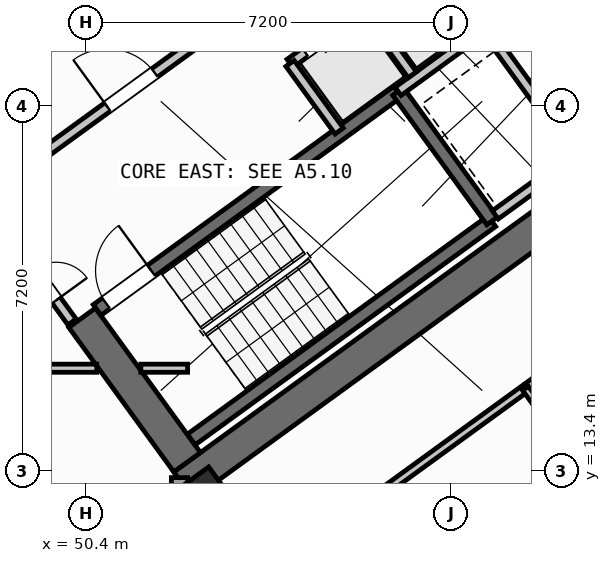
"""IFC4 building model, lengths in metres.
Left out: names, types, materials, properties, quantities, classifications, styles, units other than length and angle.
Written with IfcOpenShell. Run it as: python <this file> out.ifc"""

import sys

from ifc_helpers import new_model, si_unit, direction, frame, frame_2d, origin, origin_2d, place, context, subcontext, project, spatial, rectangle, hollow_rectangle, extrude, source, transform, mapped, element, fill, save


model = new_model("IFC4")
c1 = context("Model", 3, precision=1e-05, world=origin(), true_north=direction((0.0, 1.0)))
c2 = subcontext(c1, "Body", "Model", "MODEL_VIEW")
j1 = project(units=[si_unit("LENGTHUNIT", "METRE"), si_unit("PLANEANGLEUNIT", "RADIAN")], contexts=[c1])
p1 = place(None, origin())
s1 = spatial("IfcSite", under=j1, at=p1, CompositionType="ELEMENT")
p2 = place(p1, origin())
s2 = spatial("IfcBuilding", under=s1, at=p2, CompositionType="ELEMENT")
p3 = place(p2, frame((0.0, 0.0, 27.6)))
s3 = spatial("IfcBuildingStorey", under=s2, at=p3, CompositionType="ELEMENT", Elevation=27.6)
p4 = place(p3, frame((52.318, 13.11, 0.0), z_axis=(0.0, 0.0, 1.0), x_axis=(0.809019445368, 0.587781878776, 0.0)))
e1 = element("IfcWall", 1, at=p4, inside=s3, PredefinedType="SHEAR", context=c2, shape_type="SweptSolid", body=[
    extrude(rectangle(XDim=12.44, YDim=0.65, at=frame_2d((6.22, 0.0))), origin(), (0.0, 0.0, 1.0), 3.35),
])
p5 = place(p3, frame((52.39, 13.564, 0.0), z_axis=(0.0, 0.0, 1.0), x_axis=(-0.58779688989, 0.809008539037, 0.0)))
e2 = element("IfcWall", 2, at=p5, inside=s3, PredefinedType="SHEAR", context=c2, shape_type="SweptSolid", body=[
    extrude(rectangle(XDim=3.525, YDim=0.65, at=frame_2d((1.763, 0.0))), origin(), (0.0, 0.0, 1.0), 3.35),
])
m1 = source(origin(), c2, "Body", "SweptSolid", [
    extrude(hollow_rectangle(XDim=1.0, YDim=1.0, WallThickness=0.04, at=origin_2d()), origin(), (0.0, 0.0, 1.0), 3.6),
])
p6 = place(p3, frame((52.705, 12.773, 0.0), z_axis=(0.0, 0.0, 1.0), x_axis=(0.809016994375, 0.587785252292, 0.0)))
e3 = element("IfcColumn", 3, at=p6, inside=s3, PredefinedType="COLUMN", context=c2, shape_type="MappedRepresentation", body=[
    mapped(m1, transform((0.0, 0.0, 0.0), scale=1.0)),
])
p7 = place(p3, frame((58.455, 35.484, 0.0), z_axis=(0.0, 0.0, 1.0), x_axis=(0.587783625747, -0.809018176127, 0.0)))
e4 = element("IfcWall", 4, at=p7, inside=s3, PredefinedType="STANDARD", context=c2, shape_type="SweptSolid", body=[
    extrude(rectangle(XDim=21.587, YDim=0.32, at=frame_2d((10.794, 0.0))), origin(), (0.0, 0.0, 1.0), 2.725),
])
p8 = place(p7, frame((2.994, 0.0, 0.8)))
e5 = element("IfcOpeningElement", 5, at=p8, cuts=e4, PredefinedType="OPENING", context=c2, shape_type="SweptSolid", body=[
    extrude(rectangle(XDim=2.1, YDim=1.55, at=frame_2d((1.05, 0.775))), frame((0.0, 0.17, 0.0), z_axis=(0.0, -1.0, 0.0), x_axis=(1.0, 0.0, 0.0)), (0.0, 0.0, 1.0), 0.34),
])
p9 = place(p7, frame((11.934, 0.0, 0.85)))
e6 = element("IfcOpeningElement", 6, at=p9, cuts=e4, PredefinedType="OPENING", context=c2, shape_type="SweptSolid", body=[
    extrude(rectangle(XDim=1.8, YDim=1.5, at=frame_2d((0.9, 0.75))), frame((0.0, 0.17, 0.0), z_axis=(0.0, -1.0, 0.0), x_axis=(1.0, 0.0, 0.0)), (0.0, 0.0, 1.0), 0.34),
])
p10 = place(p7, frame((18.535, 0.0, 0.85)))
e7 = element("IfcOpeningElement", 7, at=p10, cuts=e4, PredefinedType="OPENING", context=c2, shape_type="SweptSolid", body=[
    extrude(rectangle(XDim=1.5, YDim=1.5, at=frame_2d((0.75, 0.75))), frame((0.0, 0.17, 0.0), z_axis=(0.0, -1.0, 0.0), x_axis=(1.0, 0.0, 0.0)), (0.0, 0.0, 1.0), 0.34),
])
p11 = place(p3, frame((71.098, 17.731, 0.0), z_axis=(0.0, 0.0, 1.0), x_axis=(-0.809021120468, -0.587779573171, 0.0)))
e8 = element("IfcWall", 8, at=p11, inside=s3, PredefinedType="STANDARD", context=c2, shape_type="SweptSolid", body=[
    extrude(rectangle(XDim=17.588, YDim=0.32, at=frame_2d((8.794, 0.0))), origin(), (0.0, 0.0, 1.0), 3.35),
])
p12 = place(p11, frame((1.624, 0.0, 0.0)))
e9 = element("IfcOpeningElement", 9, at=p12, cuts=e8, PredefinedType="OPENING", context=c2, shape_type="SweptSolid", body=[
    extrude(rectangle(XDim=1.05, YDim=2.15, at=frame_2d((0.525, 1.075))), frame((0.0, 0.17, 0.0), z_axis=(0.0, -1.0, 0.0), x_axis=(1.0, 0.0, 0.0)), (0.0, 0.0, 1.0), 0.34),
])
p13 = place(p11, frame((4.104, 0.0, 1.0)))
e10 = element("IfcOpeningElement", 10, at=p13, cuts=e8, PredefinedType="OPENING", context=c2, shape_type="SweptSolid", body=[
    extrude(rectangle(XDim=0.9, YDim=1.25, at=frame_2d((0.45, 0.625))), frame((0.0, 0.17, 0.0), z_axis=(0.0, -1.0, 0.0), x_axis=(1.0, 0.0, 0.0)), (0.0, 0.0, 1.0), 0.34),
])
p14 = place(p11, frame((7.879, 0.0, 0.85)))
e11 = element("IfcOpeningElement", 11, at=p14, cuts=e8, PredefinedType="OPENING", context=c2, shape_type="SweptSolid", body=[
    extrude(rectangle(XDim=1.8, YDim=1.5, at=frame_2d((0.9, 0.75))), frame((0.0, 0.17, 0.0), z_axis=(0.0, -1.0, 0.0), x_axis=(1.0, 0.0, 0.0)), (0.0, 0.0, 1.0), 0.34),
])
p15 = place(p11, frame((12.849, 0.0, 0.85)))
e12 = element("IfcOpeningElement", 12, at=p15, cuts=e8, PredefinedType="OPENING", context=c2, shape_type="SweptSolid", body=[
    extrude(rectangle(XDim=1.8, YDim=1.5, at=frame_2d((0.9, 0.75))), frame((0.0, 0.17, 0.0), z_axis=(0.0, -1.0, 0.0), x_axis=(1.0, 0.0, 0.0)), (0.0, 0.0, 1.0), 0.34),
])
p16 = place(p3, frame((52.24, 13.261, 0.0), z_axis=(0.0, 0.0, 1.0), x_axis=(0.0, -1.0, 0.0)))
e13 = element("IfcWall", 13, at=p16, inside=s3, PredefinedType="STANDARD", context=c2, shape_type="SweptSolid", body=[
    extrude(rectangle(XDim=9.795, YDim=0.32, at=frame_2d((4.897, 0.0))), origin(), (0.0, 0.0, 1.0), 3.35),
])
p17 = place(p16, frame((2.349, 0.0, 0.8)))
e14 = element("IfcOpeningElement", 14, at=p17, cuts=e13, PredefinedType="OPENING", context=c2, shape_type="SweptSolid", body=[
    extrude(rectangle(XDim=2.1, YDim=1.55, at=frame_2d((1.05, 0.775))), frame((0.0, 0.17, 0.0), z_axis=(0.0, -1.0, 0.0), x_axis=(1.0, 0.0, 0.0)), (0.0, 0.0, 1.0), 0.34),
])
p18 = place(p16, frame((7.03, 0.0, 0.85)))
e15 = element("IfcOpeningElement", 15, at=p18, cuts=e13, PredefinedType="OPENING", context=c2, shape_type="SweptSolid", body=[
    extrude(rectangle(XDim=1.8, YDim=1.5, at=frame_2d((0.9, 0.75))), frame((0.0, 0.17, 0.0), z_axis=(0.0, -1.0, 0.0), x_axis=(1.0, 0.0, 0.0)), (0.0, 0.0, 1.0), 0.34),
])
p19 = place(p3, frame((52.472, 14.013, 0.0), z_axis=(0.0, 0.0, 1.0), x_axis=(0.809028366311, 0.587769599847, 0.0)))
e16 = element("IfcWall", 16, at=p19, inside=s3, PredefinedType="SHEAR", context=c2, shape_type="SweptSolid", body=[
    extrude(rectangle(XDim=7.33, YDim=0.26, at=frame_2d((3.665, 0.0))), origin(), (0.0, 0.0, 1.0), 3.35),
])
p20 = place(p3, frame((50.615, 16.57, 0.0), z_axis=(0.0, 0.0, 1.0), x_axis=(0.809028366311, 0.587769599847, 0.0)))
e17 = element("IfcWall", 17, at=p20, inside=s3, PredefinedType="SHEAR", context=c2, shape_type="SweptSolid", body=[
    extrude(rectangle(XDim=7.33, YDim=0.26, at=frame_2d((3.665, 0.0))), origin(), (0.0, 0.0, 1.0), 3.35),
])
p21 = place(p20, frame((0.22, 0.0, 0.0)))
e18 = element("IfcOpeningElement", 18, at=p21, cuts=e17, PredefinedType="OPENING", context=c2, shape_type="SweptSolid", body=[
    extrude(rectangle(XDim=1.1, YDim=2.1, at=frame_2d((0.55, 1.05))), frame((0.0, 0.14, 0.0), z_axis=(0.0, -1.0, 0.0), x_axis=(1.0, 0.0, 0.0)), (0.0, 0.0, 1.0), 0.28),
])
p22 = place(p3, frame((58.41, 18.327, 0.0), z_axis=(0.0, 0.0, 1.0), x_axis=(-0.58776738483, 0.809029975545, 0.0)))
e19 = element("IfcWall", 19, at=p22, inside=s3, PredefinedType="SHEAR", context=c2, shape_type="SweptSolid", body=[
    extrude(rectangle(XDim=3.16, YDim=0.26, at=frame_2d((1.58, 0.0))), origin(), (0.0, 0.0, 1.0), 3.35),
])
p23 = place(p3, frame((47.106, 21.437, 0.0), z_axis=(0.0, 0.0, 1.0), x_axis=(0.809012514015, 0.58779141893, 0.0)))
e20 = element("IfcWall", 20, at=p23, inside=s3, PredefinedType="STANDARD", context=c2, shape_type="SweptSolid", body=[
    extrude(rectangle(XDim=3.398, YDim=0.2, at=frame_2d((1.699, 0.0))), origin(), (0.0, 0.0, 1.0), 3.34),
])
p24 = place(p23, frame((0.408, 0.0, 0.0)))
e21 = element("IfcOpeningElement", 21, at=p24, cuts=e20, PredefinedType="OPENING", context=c2, shape_type="SweptSolid", body=[
    extrude(rectangle(XDim=1.3, YDim=2.2, at=frame_2d((0.65, 1.1))), frame((0.0, 0.11, 0.0), z_axis=(0.0, -1.0, 0.0), x_axis=(1.0, 0.0, 0.0)), (0.0, 0.0, 1.0), 0.22),
])
p25 = place(p3, frame((48.799, 19.107, 0.0), z_axis=(0.0, 0.0, 1.0), x_axis=(0.809012959416, 0.587790805897, 0.0)))
e22 = element("IfcWall", 22, at=p25, inside=s3, PredefinedType="STANDARD", context=c2, shape_type="SweptSolid", body=[
    extrude(rectangle(XDim=5.718, YDim=0.2, at=frame_2d((2.859, 0.0))), origin(), (0.0, 0.0, 1.0), 3.34),
])
p26 = place(p25, frame((2.498, 0.0, 0.0)))
e23 = element("IfcOpeningElement", 23, at=p26, cuts=e22, PredefinedType="OPENING", context=c2, shape_type="SweptSolid", body=[
    extrude(rectangle(XDim=1.15, YDim=2.1, at=frame_2d((0.575, 1.05))), frame((0.0, 0.11, 0.0), z_axis=(0.0, -1.0, 0.0), x_axis=(1.0, 0.0, 0.0)), (0.0, 0.0, 1.0), 0.22),
])
p27 = place(p3, frame((56.553, 20.884, 0.0), z_axis=(0.0, 0.0, 1.0), x_axis=(0.809035789462, 0.587759382205, 0.0)))
e24 = element("IfcWall", 24, at=p27, inside=s3, PredefinedType="STANDARD", context=c2, shape_type="SweptSolid", body=[
    extrude(rectangle(XDim=3.768, YDim=0.2, at=frame_2d((1.884, 0.0))), origin(), (0.0, 0.0, 1.0), 3.34),
])
p28 = place(p27, frame((2.65, 0.0, 0.0)))
e25 = element("IfcOpeningElement", 25, at=p28, cuts=e24, PredefinedType="OPENING", context=c2, shape_type="SweptSolid", body=[
    extrude(rectangle(XDim=0.86, YDim=2.05, at=frame_2d((0.43, 1.025))), frame((0.0, 0.11, 0.0), z_axis=(0.0, -1.0, 0.0), x_axis=(1.0, 0.0, 0.0)), (0.0, 0.0, 1.0), 0.22),
])
p29 = place(p3, frame((54.421, 21.436, 0.0), z_axis=(0.0, 0.0, 1.0), x_axis=(0.809013710463, 0.587789772183, 0.0)))
e26 = element("IfcWall", 26, at=p29, inside=s3, PredefinedType="STANDARD", context=c2, shape_type="SweptSolid", body=[
    extrude(rectangle(XDim=5.36, YDim=0.2, at=frame_2d((2.68, 0.0))), origin(), (0.0, 0.0, 1.0), 3.34),
])
p30 = place(p29, frame((0.37, 0.0, 0.0)))
e27 = element("IfcOpeningElement", 27, at=p30, cuts=e26, PredefinedType="OPENING", context=c2, shape_type="SweptSolid", body=[
    extrude(rectangle(XDim=1.1, YDim=2.15, at=frame_2d((0.55, 1.075))), frame((0.0, 0.11, 0.0), z_axis=(0.0, -1.0, 0.0), x_axis=(1.0, 0.0, 0.0)), (0.0, 0.0, 1.0), 0.22),
])
p31 = place(p29, frame((2.17, 0.0, 0.0)))
e28 = element("IfcOpeningElement", 28, at=p31, cuts=e26, PredefinedType="OPENING", context=c2, shape_type="SweptSolid", body=[
    extrude(rectangle(XDim=1.1, YDim=2.15, at=frame_2d((0.55, 1.075))), frame((0.0, 0.11, 0.0), z_axis=(0.0, -1.0, 0.0), x_axis=(1.0, 0.0, 0.0)), (0.0, 0.0, 1.0), 0.22),
])
p32 = place(p29, frame((3.97, 0.0, 0.0)))
e29 = element("IfcOpeningElement", 29, at=p32, cuts=e26, PredefinedType="OPENING", context=c2, shape_type="SweptSolid", body=[
    extrude(rectangle(XDim=1.1, YDim=2.15, at=frame_2d((0.55, 1.075))), frame((0.0, 0.11, 0.0), z_axis=(0.0, -1.0, 0.0), x_axis=(1.0, 0.0, 0.0)), (0.0, 0.0, 1.0), 0.22),
])
p33 = place(p3, frame((55.391, 20.102, 0.0), z_axis=(0.0, 0.0, 1.0), x_axis=(-0.58778447739, 0.809017557374, 0.0)))
e30 = element("IfcWall", 30, at=p33, inside=s3, PredefinedType="STANDARD", context=c2, shape_type="SweptSolid", body=[
    extrude(rectangle(XDim=1.65, YDim=0.2, at=frame_2d((0.825, 0.0))), origin(), (0.0, 0.0, 1.0), 3.34),
])
p34 = place(p3, frame((56.834, 21.212, 0.0), z_axis=(0.0, 0.0, 1.0), x_axis=(-0.58776738483, 0.809029975545, 0.0)))
e31 = element("IfcWall", 31, at=p34, inside=s3, PredefinedType="STANDARD", context=c2, shape_type="SweptSolid", body=[
    extrude(rectangle(XDim=1.58, YDim=0.2, at=frame_2d((0.79, 0.0))), origin(), (0.0, 0.0, 1.0), 3.34),
])
p35 = place(p3, frame((60.067, 19.655, 0.0), z_axis=(0.0, 0.0, 1.0), x_axis=(-0.587800520745, 0.809005900975, 0.0)))
e32 = element("IfcWall", 32, at=p35, inside=s3, PredefinedType="STANDARD", context=c2, shape_type="SweptSolid", body=[
    extrude(rectangle(XDim=2.66, YDim=0.2, at=frame_2d((1.33, 0.0))), origin(), (0.0, 0.0, 1.0), 3.34),
])
p36 = place(p3, frame((58.472, 18.447, 0.0), z_axis=(0.0, 0.0, 1.0), x_axis=(0.809022487728, 0.587777691266, 0.0)))
e33 = element("IfcWall", 33, at=p36, inside=s3, PredefinedType="STANDARD", context=c2, shape_type="SweptSolid", body=[
    extrude(rectangle(XDim=3.648, YDim=0.2, at=frame_2d((1.824, 0.0))), origin(), (0.0, 0.0, 1.0), 3.34),
])
p37 = place(p3, frame((35.296, 15.42, 0.0), z_axis=(0.0, 0.0, 1.0), x_axis=(1.0, 0.0, 0.0)))
e34 = element("IfcWall", 34, at=p37, inside=s3, PredefinedType="PARTITIONING", context=c2, shape_type="SweptSolid", body=[
    extrude(rectangle(XDim=15.311, YDim=0.16, at=frame_2d((7.655, 0.0))), origin(), (0.0, 0.0, 1.0), 3.34),
])
p38 = place(p37, frame((0.615, 0.0, 0.0)))
e35 = element("IfcOpeningElement", 35, at=p38, cuts=e34, PredefinedType="OPENING", context=c2, shape_type="SweptSolid", body=[
    extrude(rectangle(XDim=1.0, YDim=2.1, at=frame_2d((0.5, 1.05))), frame((0.0, 0.09, 0.0), z_axis=(0.0, -1.0, 0.0), x_axis=(1.0, 0.0, 0.0)), (0.0, 0.0, 1.0), 0.18),
])
p39 = place(p37, frame((9.035, 0.0, 0.0)))
e36 = element("IfcOpeningElement", 36, at=p39, cuts=e34, PredefinedType="OPENING", context=c2, shape_type="SweptSolid", body=[
    extrude(rectangle(XDim=1.0, YDim=2.1, at=frame_2d((0.5, 1.05))), frame((0.0, 0.09, 0.0), z_axis=(0.0, -1.0, 0.0), x_axis=(1.0, 0.0, 0.0)), (0.0, 0.0, 1.0), 0.18),
])
p40 = place(p3, frame((51.477, 15.42, 0.0), z_axis=(0.0, 0.0, 1.0), x_axis=(1.0, 0.0, 0.0)))
e37 = element("IfcWall", 37, at=p40, inside=s3, PredefinedType="PARTITIONING", context=c2, shape_type="SweptSolid", body=[
    extrude(rectangle(XDim=0.923, YDim=0.16, at=frame_2d((0.461, 0.0))), origin(), (0.0, 0.0, 1.0), 3.34),
])
p41 = place(p3, frame((50.119, 16.333, 0.0), z_axis=(0.0, 0.0, 1.0), x_axis=(-0.587749856981, 0.809042709391, 0.0)))
e38 = element("IfcWall", 38, at=p41, inside=s3, PredefinedType="STANDARD", context=c2, shape_type="SweptSolid", body=[
    extrude(rectangle(XDim=2.96, YDim=0.2, at=frame_2d((1.48, 0.0))), origin(), (0.0, 0.0, 1.0), 3.34),
])
p42 = place(p41, frame((0.53, 0.0, 0.0)))
e39 = element("IfcOpeningElement", 39, at=p42, cuts=e38, PredefinedType="OPENING", context=c2, shape_type="SweptSolid", body=[
    extrude(rectangle(XDim=1.5, YDim=2.15, at=frame_2d((0.75, 1.075))), frame((0.0, 0.11, 0.0), z_axis=(0.0, -1.0, 0.0), x_axis=(1.0, 0.0, 0.0)), (0.0, 0.0, 1.0), 0.22),
])
p43 = place(p3, frame((53.705, 11.126, 0.0), z_axis=(0.0, 0.0, 1.0), x_axis=(0.809014504436, 0.587788679384, 0.0)))
e40 = element("IfcWall", 40, at=p43, inside=s3, PredefinedType="PARTITIONING", context=c2, shape_type="SweptSolid", body=[
    extrude(rectangle(XDim=14.67, YDim=0.16, at=frame_2d((7.335, 0.0))), origin(), (0.0, 0.0, 1.0), 3.34),
])
p44 = place(p43, frame((10.2, 0.0, 0.0)))
e41 = element("IfcOpeningElement", 41, at=p44, cuts=e40, PredefinedType="OPENING", context=c2, shape_type="SweptSolid", body=[
    extrude(rectangle(XDim=1.0, YDim=2.1, at=frame_2d((0.5, 1.05))), frame((0.0, 0.09, 0.0), z_axis=(0.0, -1.0, 0.0), x_axis=(1.0, 0.0, 0.0)), (0.0, 0.0, 1.0), 0.18),
])
p45 = place(p3, frame((56.249, 9.785, 0.0), z_axis=(0.0, 0.0, 1.0), x_axis=(0.809011747655, 0.587792473715, 0.0)))
e42 = element("IfcWall", 42, at=p45, inside=s3, PredefinedType="PLUMBINGWALL", context=c2, shape_type="SweptSolid", body=[
    extrude(rectangle(XDim=13.4, YDim=0.14, at=frame_2d((6.7, 0.0))), origin(), (0.0, 0.0, 1.0), 3.34),
])
p46 = place(p45, frame((8.94, 0.0, 0.0)))
e43 = element("IfcOpeningElement", 43, at=p46, cuts=e42, PredefinedType="OPENING", context=c2, shape_type="SweptSolid", body=[
    extrude(rectangle(XDim=0.92, YDim=2.08, at=frame_2d((0.46, 1.04))), frame((0.0, 0.08, 0.0), z_axis=(0.0, -1.0, 0.0), x_axis=(1.0, 0.0, 0.0)), (0.0, 0.0, 1.0), 0.16),
])
p47 = place(p3, frame((60.585, 12.936, 0.0), z_axis=(0.0, 0.0, 1.0), x_axis=(-0.587772116736, 0.809026537752, 0.0)))
e44 = element("IfcWall", 44, at=p47, inside=s3, PredefinedType="PLUMBINGWALL", context=c2, shape_type="SweptSolid", body=[
    extrude(rectangle(XDim=2.58, YDim=0.14, at=frame_2d((1.29, 0.0))), origin(), (0.0, 0.0, 1.0), 3.34),
])
p48 = place(p47, frame((0.9, 0.0, 0.0)))
e45 = element("IfcOpeningElement", 45, at=p48, cuts=e44, PredefinedType="OPENING", context=c2, shape_type="SweptSolid", body=[
    extrude(rectangle(XDim=0.78, YDim=2.05, at=frame_2d((0.39, 1.025))), frame((0.0, 0.08, 0.0), z_axis=(0.0, -1.0, 0.0), x_axis=(1.0, 0.0, 0.0)), (0.0, 0.0, 1.0), 0.16),
])
m2 = source(origin(), c2, "Body", "SweptSolid", [
    extrude(rectangle(XDim=1.1, YDim=2.1, at=frame_2d((0.55, 1.05))), frame((0.0, 0.025, 0.0), z_axis=(0.0, -1.0, 0.0), x_axis=(1.0, 0.0, 0.0)), (0.0, 0.0, 1.0), 0.05),
])
p49 = place(p21, origin())
e46 = element("IfcDoor", 46, at=p49, inside=s3, OperationType="SINGLE_SWING_RIGHT", PredefinedType="DOOR", context=c2, shape_type="MappedRepresentation", body=[
    mapped(m2, transform((0.0, 0.0, 0.0), scale=1.0)),
])
fill(e18, e46)
m3 = source(origin(), c2, "Body", "SweptSolid", [
    extrude(rectangle(XDim=1.15, YDim=2.1, at=frame_2d((0.575, 1.05))), frame((0.0, 0.025, 0.0), z_axis=(0.0, -1.0, 0.0), x_axis=(1.0, 0.0, 0.0)), (0.0, 0.0, 1.0), 0.05),
])
p50 = place(p26, origin())
e47 = element("IfcDoor", 47, at=p50, inside=s3, OperationType="SINGLE_SWING_LEFT", PredefinedType="DOOR", context=c2, shape_type="MappedRepresentation", body=[
    mapped(m3, transform((0.0, 0.0, 0.0), scale=1.0)),
])
fill(e23, e47)
m4 = source(origin(), c2, "Body", "SweptSolid", [
    extrude(rectangle(XDim=1.1, YDim=2.15, at=frame_2d((0.55, 1.075))), frame((0.0, 0.025, 0.0), z_axis=(0.0, -1.0, 0.0), x_axis=(1.0, 0.0, 0.0)), (0.0, 0.0, 1.0), 0.05),
])
p51 = place(p30, origin())
e48 = element("IfcDoor", 48, at=p51, inside=s3, OperationType="DOUBLE_DOOR_SLIDING", PredefinedType="DOOR", context=c2, shape_type="MappedRepresentation", body=[
    mapped(m4, transform((0.0, 0.0, 0.0), scale=1.0)),
])
fill(e27, e48)
m5 = source(origin(), c2, "Body", "SweptSolid", [
    extrude(rectangle(XDim=1.5, YDim=2.15, at=frame_2d((0.75, 1.075))), frame((0.0, 0.025, 0.0), z_axis=(0.0, -1.0, 0.0), x_axis=(1.0, 0.0, 0.0)), (0.0, 0.0, 1.0), 0.05),
])
p52 = place(p42, frame((1.5, 0.0, 0.0), z_axis=(0.0, 0.0, 1.0), x_axis=(-1.0, 0.0, 0.0)))
e49 = element("IfcDoor", 49, at=p52, inside=s3, OperationType="DOUBLE_DOOR_SINGLE_SWING", PredefinedType="DOOR", context=c2, shape_type="MappedRepresentation", body=[
    mapped(m5, transform((0.0, 0.0, 0.0), scale=1.0)),
])
fill(e39, e49)
save(model, sys.argv[1])
